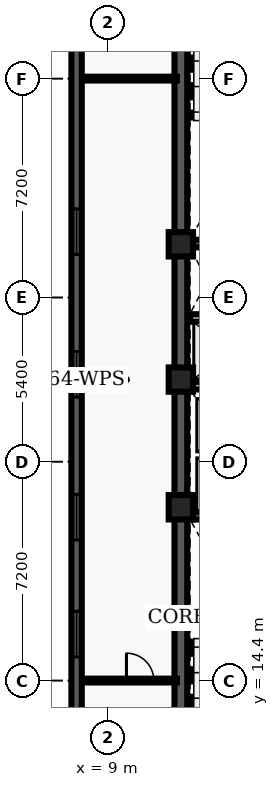
"""IFC4 building model, lengths in metres.
Left out: names, types, materials, properties, quantities, classifications, styles, units other than length and angle.
Written with IfcOpenShell. Run it as: python <this file> out.ifc"""

import sys

from ifc_helpers import new_model, entity, si_unit, converted_unit, direction, frame, origin_with_axes, origin_2d_with_axis, place, context, subcontext, project, spatial, polyline, rectangle, outline, extrude, element, fill, save


model = new_model("IFC4")
c1 = context("Model", 3, precision=1e-05, world=origin_with_axes(), true_north=direction((0.0, 1.0)))
c2 = subcontext(c1, "Body", "Model", "MODEL_VIEW")
j1 = project(units=[si_unit("LENGTHUNIT", "METRE"), converted_unit("PLANEANGLEUNIT", "DEGREE", entity("IfcPlaneAngleMeasure", 0.017), si_unit("PLANEANGLEUNIT", "RADIAN"), dimensions=[0, 0, 0, 0, 0, 0, 0])], contexts=[c1])
p1 = place(None, origin_with_axes())
s1 = spatial("IfcSite", under=j1, at=p1, CompositionType="ELEMENT")
p2 = place(p1, origin_with_axes())
s2 = spatial("IfcBuilding", under=s1, at=p2, CompositionType="ELEMENT")
p3 = place(p2, frame((0.0, 0.0, 260.7), z_axis=(0.0, 0.0, 1.0), x_axis=(1.0, 0.0, 0.0)))
s3 = spatial("IfcBuildingStorey", under=s2, at=p3, CompositionType="ELEMENT", Elevation=260.7)
p4 = place(p3, frame((11.4, 10.8, 0.0), z_axis=(0.0, 0.0, 1.0), x_axis=(0.0, 1.0, 0.0)))
e1 = element("IfcWall", 1, at=p4, inside=s3, PredefinedType="SHEAR", context=c2, shape_type="SweptSolid", body=[
    extrude(outline(polyline([(0.0, -0.21), (27.0, -0.21), (27.0, 0.21), (0.0, 0.21), (0.0, -0.21)])), origin_with_axes(), (0.0, 0.0, 1.0), 3.66),
])
for number, where, z_axis, x_axis in (
    (2, (11.61, 19.825, 0.0), (0.0, 0.0, 1.0), (1.0, 0.0, 0.0)),
    (3, (11.61, 28.775, 0.0), (0.0, 0.0, 1.0), (1.0, 0.0, 0.0)),
):
    element("IfcWall", number, at=place(p3, frame(where, z_axis=z_axis, x_axis=x_axis)), inside=s3, PredefinedType="SHEAR", context=c2, shape_type="SweptSolid", body=[
        extrude(outline(polyline([(0.0, -0.125), (6.78, -0.125), (6.78, 0.125), (0.0, 0.125), (0.0, -0.125)])), origin_with_axes(), (0.0, 0.0, 1.0), 3.66),
    ])
p5 = place(p3, frame((11.7, 24.1, 0.0), z_axis=(0.0, 0.0, 1.0), x_axis=(1.0, 0.0, 0.0)))
e4 = element("IfcWall", 4, at=p5, inside=s3, PredefinedType="SOLIDWALL", context=c2, shape_type="SweptSolid", body=[
    extrude(outline(polyline([(0.0, -0.125), (6.6, -0.125), (6.6, 0.125), (0.0, 0.125), (0.0, -0.125)])), origin_with_axes(), (0.0, 0.0, 1.0), 2.7),
])
p6 = place(p5, frame((3.75, 0.0, 0.0), z_axis=(0.0, 0.0, 1.0), x_axis=(1.0, 0.0, 0.0)))
e5 = element("IfcOpeningElement", 5, at=p6, cuts=e4, PredefinedType="OPENING", context=c2, shape_type="SweptSolid", body=[
    extrude(rectangle(XDim=0.9, YDim=0.27, at=origin_2d_with_axis()), origin_with_axes(), (0.0, 0.0, 1.0), 2.15),
])
p7 = place(p3, frame((11.7, 26.325, 0.0), z_axis=(0.0, 0.0, 1.0), x_axis=(1.0, 0.0, 0.0)))
e6 = element("IfcWall", 6, at=p7, inside=s3, PredefinedType="SOLIDWALL", context=c2, shape_type="SweptSolid", body=[
    extrude(outline(polyline([(0.0, -0.125), (6.6, -0.125), (6.6, 0.125), (0.0, 0.125), (0.0, -0.125)])), origin_with_axes(), (0.0, 0.0, 1.0), 2.7),
])
p8 = place(p7, frame((3.5, 0.0, 0.0), z_axis=(0.0, 0.0, 1.0), x_axis=(1.0, 0.0, 0.0)))
e7 = element("IfcOpeningElement", 7, at=p8, cuts=e6, PredefinedType="OPENING", context=c2, shape_type="SweptSolid", body=[
    extrude(rectangle(XDim=0.9, YDim=0.27, at=origin_2d_with_axis()), origin_with_axes(), (0.0, 0.0, 1.0), 2.15),
])
for number, where, z_axis, x_axis in (
    (8, (11.4, 20.1, 0.0), (0.0, 0.0, 1.0), (1.0, 0.0, 0.0)),
    (9, (11.4, 24.3, 0.0), (0.0, 0.0, 1.0), (1.0, 0.0, 0.0)),
    (10, (11.4, 28.75, 0.0), (0.0, 0.0, 1.0), (1.0, 0.0, 0.0)),
):
    element("IfcColumn", number, at=place(p3, frame(where, z_axis=z_axis, x_axis=x_axis)), inside=s3, PredefinedType="COLUMN", context=c2, shape_type="SweptSolid", body=[
        extrude(rectangle(XDim=0.8, YDim=0.8, at=origin_2d_with_axis()), origin_with_axes(), (0.0, 0.0, 1.0), 3.9),
    ])
p9 = place(p3, frame((8.135, 14.4, 0.0), z_axis=(0.0, 0.0, 1.0), x_axis=(1.0, 0.0, 0.0)))
e11 = element("IfcWall", 11, at=p9, inside=s3, PredefinedType="PARTITIONING", context=c2, shape_type="SweptSolid", body=[
    extrude(outline(polyline([(0.0, -0.062), (3.135, -0.062), (3.135, 0.062), (0.0, 0.062), (0.0, -0.062)])), origin_with_axes(), (0.0, 0.0, 1.0), 2.7),
])
p10 = place(p9, frame((1.925, 0.0, 0.0), z_axis=(0.0, 0.0, 1.0), x_axis=(1.0, 0.0, 0.0)))
e12 = element("IfcOpeningElement", 12, at=p10, cuts=e11, PredefinedType="OPENING", context=c2, shape_type="SweptSolid", body=[
    extrude(rectangle(XDim=0.9, YDim=0.145, at=origin_2d_with_axis()), origin_with_axes(), (0.0, 0.0, 1.0), 2.15),
])
p11 = place(p3, frame((8.135, 34.2, 0.0), z_axis=(0.0, 0.0, 1.0), x_axis=(1.0, 0.0, 0.0)))
e13 = element("IfcWall", 13, at=p11, inside=s3, PredefinedType="PARTITIONING", context=c2, shape_type="SweptSolid", body=[
    extrude(outline(polyline([(0.0, -0.062), (3.135, -0.062), (3.135, 0.062), (0.0, 0.062), (0.0, -0.062)])), origin_with_axes(), (0.0, 0.0, 1.0), 2.7),
])
p12 = place(p3, frame((7.97, 2.74, 0.0), z_axis=(0.0, 0.0, 1.0), x_axis=(0.0, 1.0, 0.0)))
e14 = element("IfcWall", 14, at=p12, inside=s3, PredefinedType="SOLIDWALL", context=c2, shape_type="SweptSolid", body=[
    extrude(outline(polyline([(0.0, -0.17), (43.46, -0.17), (43.46, 0.17), (0.0, 0.17), (0.0, -0.17)])), origin_with_axes(), (0.0, 0.0, 1.0), 3.66),
])
p13 = place(p12, frame((2.948, 0.0, 0.45), z_axis=(0.0, 0.0, 1.0), x_axis=(1.0, 0.0, 0.0)))
e15 = element("IfcOpeningElement", 15, at=p13, cuts=e14, PredefinedType="OPENING", context=c2, shape_type="SweptSolid", body=[
    extrude(rectangle(XDim=1.5, YDim=0.36, at=origin_2d_with_axis()), origin_with_axes(), (0.0, 0.0, 1.0), 2.1),
])
p14 = place(p12, frame((7.643, 0.0, 0.45), z_axis=(0.0, 0.0, 1.0), x_axis=(1.0, 0.0, 0.0)))
e16 = element("IfcOpeningElement", 16, at=p14, cuts=e14, PredefinedType="OPENING", context=c2, shape_type="SweptSolid", body=[
    extrude(rectangle(XDim=1.5, YDim=0.36, at=origin_2d_with_axis()), origin_with_axes(), (0.0, 0.0, 1.0), 2.1),
])
p15 = place(p12, frame((13.189, 0.0, 0.45), z_axis=(0.0, 0.0, 1.0), x_axis=(1.0, 0.0, 0.0)))
e17 = element("IfcOpeningElement", 17, at=p15, cuts=e14, PredefinedType="OPENING", context=c2, shape_type="SweptSolid", body=[
    extrude(rectangle(XDim=1.5, YDim=0.36, at=origin_2d_with_axis()), origin_with_axes(), (0.0, 0.0, 1.0), 2.1),
])
p16 = place(p12, frame((17.034, 0.0, 0.45), z_axis=(0.0, 0.0, 1.0), x_axis=(1.0, 0.0, 0.0)))
e18 = element("IfcOpeningElement", 18, at=p16, cuts=e14, PredefinedType="OPENING", context=c2, shape_type="SweptSolid", body=[
    extrude(rectangle(XDim=1.5, YDim=0.36, at=origin_2d_with_axis()), origin_with_axes(), (0.0, 0.0, 1.0), 2.1),
])
p17 = place(p12, frame((21.73, 0.0, 0.45), z_axis=(0.0, 0.0, 1.0), x_axis=(1.0, 0.0, 0.0)))
e19 = element("IfcOpeningElement", 19, at=p17, cuts=e14, PredefinedType="OPENING", context=c2, shape_type="SweptSolid", body=[
    extrude(rectangle(XDim=1.5, YDim=0.36, at=origin_2d_with_axis()), origin_with_axes(), (0.0, 0.0, 1.0), 2.1),
])
p18 = place(p12, frame((26.426, 0.0, 0.45), z_axis=(0.0, 0.0, 1.0), x_axis=(1.0, 0.0, 0.0)))
e20 = element("IfcOpeningElement", 20, at=p18, cuts=e14, PredefinedType="OPENING", context=c2, shape_type="SweptSolid", body=[
    extrude(rectangle(XDim=1.5, YDim=0.36, at=origin_2d_with_axis()), origin_with_axes(), (0.0, 0.0, 1.0), 2.1),
])
p19 = place(p12, frame((35.817, 0.0, 0.45), z_axis=(0.0, 0.0, 1.0), x_axis=(1.0, 0.0, 0.0)))
e21 = element("IfcOpeningElement", 21, at=p19, cuts=e14, PredefinedType="OPENING", context=c2, shape_type="SweptSolid", body=[
    extrude(rectangle(XDim=1.5, YDim=0.36, at=origin_2d_with_axis()), origin_with_axes(), (0.0, 0.0, 1.0), 2.1),
])
p20 = place(p12, frame((40.512, 0.0, 0.45), z_axis=(0.0, 0.0, 1.0), x_axis=(1.0, 0.0, 0.0)))
e22 = element("IfcOpeningElement", 22, at=p20, cuts=e14, PredefinedType="OPENING", context=c2, shape_type="SweptSolid", body=[
    extrude(rectangle(XDim=1.5, YDim=0.36, at=origin_2d_with_axis()), origin_with_axes(), (0.0, 0.0, 1.0), 2.1),
])
p21 = place(p9, frame((1.925, 0.0, 0.0), z_axis=(0.0, 0.0, 1.0), x_axis=(1.0, 0.0, 0.0)))
e23 = element("IfcDoor", 23, at=p21, inside=s3, OperationType="SINGLE_SWING_LEFT", PredefinedType="DOOR", context=c2, shape_type="SweptSolid", body=[
    extrude(rectangle(XDim=0.9, YDim=0.075, at=origin_2d_with_axis()), origin_with_axes(), (0.0, 0.0, 1.0), 2.15),
])
fill(e12, e23)
p22 = place(p12, frame((13.189, 0.0, 0.45), z_axis=(0.0, 0.0, 1.0), x_axis=(1.0, 0.0, 0.0)))
e24 = element("IfcWindow", 24, at=p22, inside=s3, PredefinedType="WINDOW", context=c2, shape_type="SweptSolid", body=[
    extrude(rectangle(XDim=1.5, YDim=0.09, at=origin_2d_with_axis()), origin_with_axes(), (0.0, 0.0, 1.0), 2.1),
])
fill(e17, e24)
p23 = place(p12, frame((17.034, 0.0, 0.45), z_axis=(0.0, 0.0, 1.0), x_axis=(1.0, 0.0, 0.0)))
e25 = element("IfcWindow", 25, at=p23, inside=s3, PredefinedType="WINDOW", context=c2, shape_type="SweptSolid", body=[
    extrude(rectangle(XDim=1.5, YDim=0.09, at=origin_2d_with_axis()), origin_with_axes(), (0.0, 0.0, 1.0), 2.1),
])
fill(e18, e25)
p24 = place(p12, frame((21.73, 0.0, 0.45), z_axis=(0.0, 0.0, 1.0), x_axis=(1.0, 0.0, 0.0)))
e26 = element("IfcWindow", 26, at=p24, inside=s3, PredefinedType="WINDOW", context=c2, shape_type="SweptSolid", body=[
    extrude(rectangle(XDim=1.5, YDim=0.09, at=origin_2d_with_axis()), origin_with_axes(), (0.0, 0.0, 1.0), 2.1),
])
fill(e19, e26)
p25 = place(p12, frame((26.426, 0.0, 0.45), z_axis=(0.0, 0.0, 1.0), x_axis=(1.0, 0.0, 0.0)))
e27 = element("IfcWindow", 27, at=p25, inside=s3, PredefinedType="WINDOW", context=c2, shape_type="SweptSolid", body=[
    extrude(rectangle(XDim=1.5, YDim=0.09, at=origin_2d_with_axis()), origin_with_axes(), (0.0, 0.0, 1.0), 2.1),
])
fill(e20, e27)
save(model, sys.argv[1])
